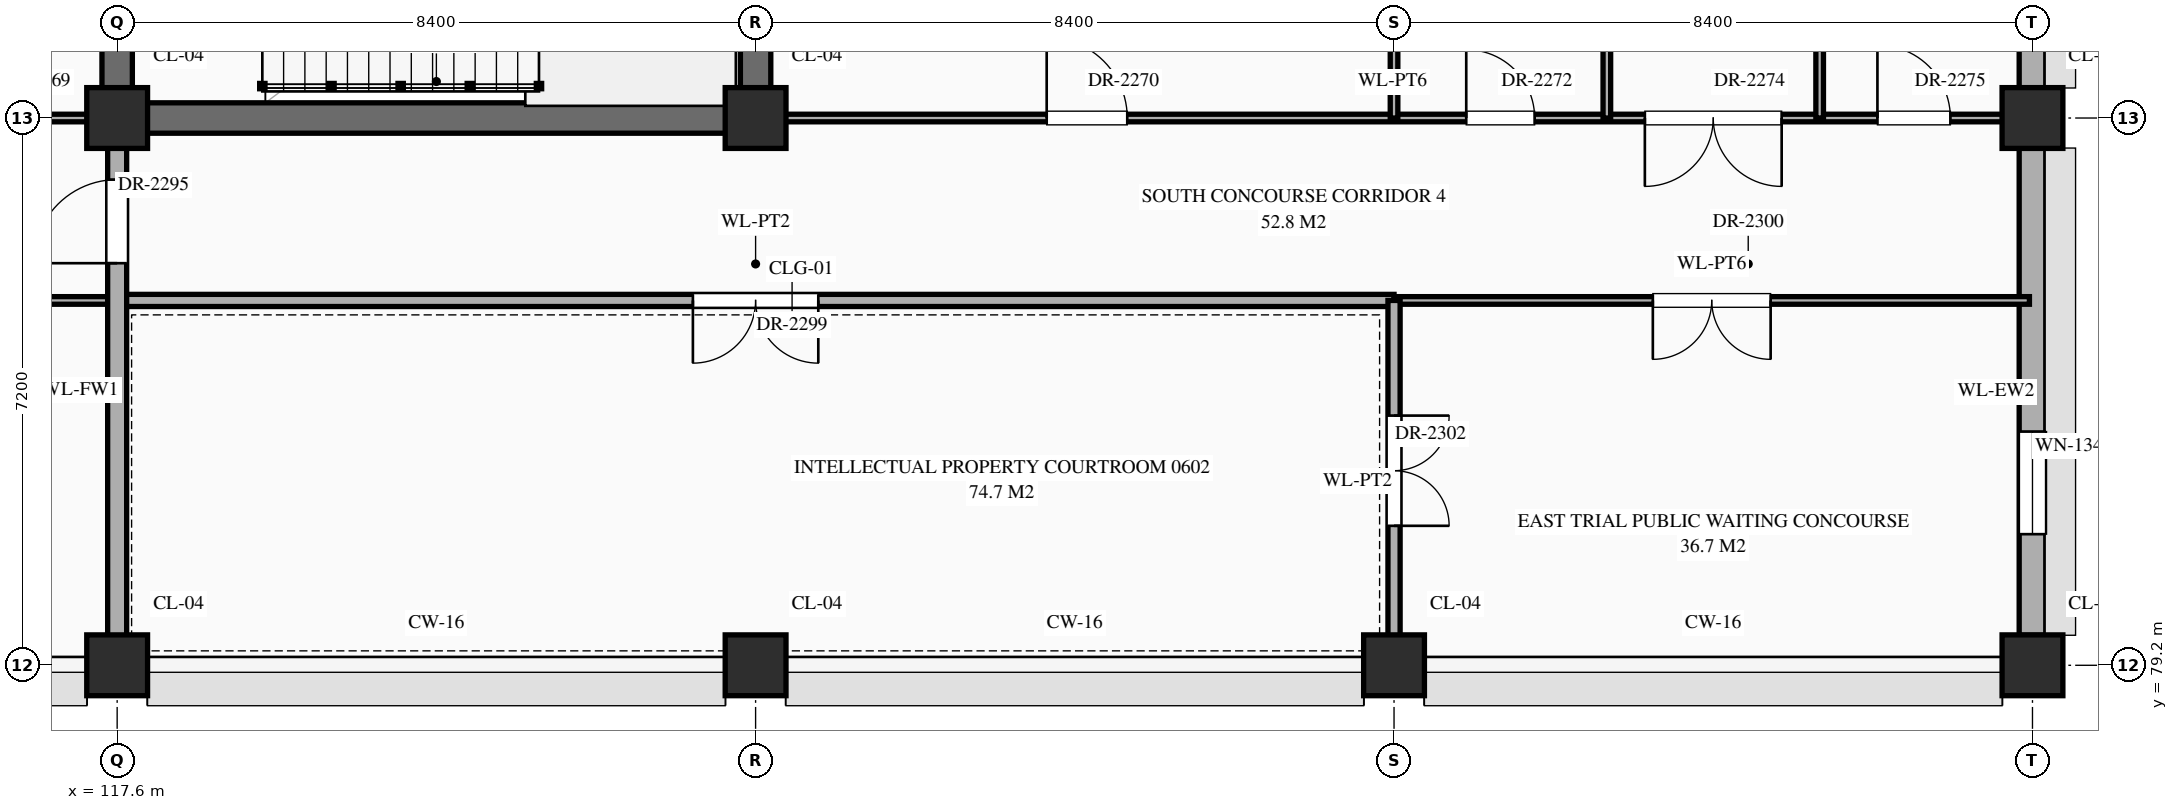
"""IFC4 building model, lengths in metres.
Left out: names, types, materials, properties, quantities, classifications, styles, units other than length and angle.
Written with IfcOpenShell. Run it as: python <this file> out.ifc"""

import sys

from ifc_helpers import new_model, si_unit, direction, frame, frame_2d, origin, origin_2d, place, context, subcontext, project, spatial, rectangle, extrude, element, fill, save


model = new_model("IFC4")
c1 = context("Model", 3, precision=1e-05, world=origin(), true_north=direction((0.0, 1.0)))
c2 = subcontext(c1, "Body", "Model", "MODEL_VIEW")
j1 = project(units=[si_unit("LENGTHUNIT", "METRE"), si_unit("PLANEANGLEUNIT", "RADIAN")], contexts=[c1])
p1 = place(None, origin())
s1 = spatial("IfcSite", under=j1, at=p1, CompositionType="ELEMENT")
p2 = place(p1, origin())
s2 = spatial("IfcBuilding", under=s1, at=p2, CompositionType="ELEMENT")
p3 = place(p2, frame((0.0, 0.0, 26.1)))
s3 = spatial("IfcBuildingStorey", under=s2, at=p3, CompositionType="ELEMENT", Elevation=26.1)
for number, where, z_axis, x_axis in (
    (1, (117.6, 79.2, 0.0), (0.0, 0.0, 1.0), (1.0, 0.0, 0.0)),
    (2, (117.6, 86.4, 0.0), (0.0, 0.0, 1.0), (1.0, 0.0, 0.0)),
    (3, (126.0, 79.2, 0.0), (0.0, 0.0, 1.0), (1.0, 0.0, 0.0)),
    (4, (126.0, 86.4, 0.0), (0.0, 0.0, 1.0), (1.0, 0.0, 0.0)),
    (5, (134.4, 79.2, 0.0), (0.0, 0.0, 1.0), (1.0, 0.0, 0.0)),
    (6, (142.8, 79.2, 0.0), (0.0, 0.0, 1.0), (1.0, 0.0, 0.0)),
    (7, (142.8, 86.4, 0.0), (0.0, 0.0, 1.0), (1.0, 0.0, 0.0)),
):
    element("IfcColumn", number, at=place(p3, frame(where, z_axis=z_axis, x_axis=x_axis)), inside=s3, PredefinedType="COLUMN", context=c2, shape_type="SweptSolid", body=[
        extrude(rectangle(XDim=0.8, YDim=0.8, at=origin_2d()), origin(), (0.0, 0.0, 1.0), 4.5),
    ])
p4 = place(p3, frame((142.8, 79.595, 0.0), z_axis=(0.0, 0.0, 1.0), x_axis=(0.0, 1.0, 0.0)))
e8 = element("IfcWall", 8, at=p4, inside=s3, PredefinedType="STANDARD", context=c2, shape_type="SweptSolid", body=[
    extrude(rectangle(XDim=6.41, YDim=0.35, at=frame_2d((3.205, 0.0))), origin(), (0.0, 0.0, 1.0), 3.59),
])
p5 = place(p4, frame((1.33, 0.0, 0.85)))
e9 = element("IfcOpeningElement", 9, at=p5, cuts=e8, PredefinedType="OPENING", context=c2, shape_type="SweptSolid", body=[
    extrude(rectangle(XDim=1.35, YDim=1.92, at=frame_2d((0.675, 0.96))), frame((0.0, 0.187, 0.0), z_axis=(0.0, -1.0, 0.0), x_axis=(1.0, 0.0, 0.0)), (0.0, 0.0, 1.0), 0.374),
])
p6 = place(p3, frame((142.8, 86.795, 0.0), z_axis=(0.0, 0.0, 1.0), x_axis=(0.0, 1.0, 0.0)))
e10 = element("IfcWall", 10, at=p6, inside=s3, PredefinedType="STANDARD", context=c2, shape_type="SweptSolid", body=[
    extrude(rectangle(XDim=6.41, YDim=0.35, at=frame_2d((3.205, 0.0))), origin(), (0.0, 0.0, 1.0), 3.59),
])
p7 = place(p6, frame((2.605, 0.0, 0.85)))
e11 = element("IfcOpeningElement", 11, at=p7, cuts=e10, PredefinedType="OPENING", context=c2, shape_type="SweptSolid", body=[
    extrude(rectangle(XDim=1.2, YDim=2.12, at=frame_2d((0.6, 1.06))), frame((0.0, 0.187, 0.0), z_axis=(0.0, -1.0, 0.0), x_axis=(1.0, 0.0, 0.0)), (0.0, 0.0, 1.0), 0.374),
])
p8 = place(p3, frame((100.8, 84.0, 0.0), z_axis=(0.0, 0.0, 1.0), x_axis=(1.0, 0.0, 0.0)))
e12 = element("IfcWall", 12, at=p8, inside=s3, PredefinedType="STANDARD", context=c2, shape_type="SweptSolid", body=[
    extrude(rectangle(XDim=16.8, YDim=0.1, at=frame_2d((8.4, 0.0))), origin(), (0.0, 0.0, 1.0), 4.24),
])
p9 = place(p8, frame((3.62, 0.0, 0.0)))
e13 = element("IfcOpeningElement", 13, at=p9, cuts=e12, PredefinedType="OPENING", context=c2, shape_type="SweptSolid", body=[
    extrude(rectangle(XDim=1.16, YDim=2.3, at=frame_2d((0.58, 1.15))), frame((0.0, 0.062, 0.0), z_axis=(0.0, -1.0, 0.0), x_axis=(1.0, 0.0, 0.0)), (0.0, 0.0, 1.0), 0.124),
])
p10 = place(p8, frame((12.0, 0.0, 0.0)))
e14 = element("IfcOpeningElement", 14, at=p10, cuts=e12, PredefinedType="OPENING", context=c2, shape_type="SweptSolid", body=[
    extrude(rectangle(XDim=1.2, YDim=2.35, at=frame_2d((0.6, 1.175))), frame((0.0, 0.062, 0.0), z_axis=(0.0, -1.0, 0.0), x_axis=(1.0, 0.0, 0.0)), (0.0, 0.0, 1.0), 0.124),
])
p11 = place(p3, frame((117.6, 84.0, 0.0), z_axis=(0.0, 0.0, 1.0), x_axis=(1.0, 0.0, 0.0)))
e15 = element("IfcWall", 15, at=p11, inside=s3, PredefinedType="STANDARD", context=c2, shape_type="SweptSolid", body=[
    extrude(rectangle(XDim=16.8, YDim=0.16, at=frame_2d((8.4, 0.0))), origin(), (0.0, 0.0, 1.0), 4.24),
])
p12 = place(p11, frame((7.575, 0.0, 0.0)))
e16 = element("IfcOpeningElement", 16, at=p12, cuts=e15, PredefinedType="OPENING", context=c2, shape_type="SweptSolid", body=[
    extrude(rectangle(XDim=1.65, YDim=2.4, at=frame_2d((0.825, 1.2))), frame((0.0, 0.092, 0.0), z_axis=(0.0, -1.0, 0.0), x_axis=(1.0, 0.0, 0.0)), (0.0, 0.0, 1.0), 0.184),
])
p13 = place(p3, frame((134.4, 84.0, 0.0), z_axis=(0.0, 0.0, 1.0), x_axis=(1.0, 0.0, 0.0)))
e17 = element("IfcWall", 17, at=p13, inside=s3, PredefinedType="STANDARD", context=c2, shape_type="SweptSolid", body=[
    extrude(rectangle(XDim=8.36, YDim=0.1, at=frame_2d((4.18, 0.0))), origin(), (0.0, 0.0, 1.0), 4.24),
])
p14 = place(p13, frame((3.405, 0.0, 0.0)))
e18 = element("IfcOpeningElement", 18, at=p14, cuts=e17, PredefinedType="OPENING", context=c2, shape_type="SweptSolid", body=[
    extrude(rectangle(XDim=1.55, YDim=2.35, at=frame_2d((0.775, 1.175))), frame((0.0, 0.062, 0.0), z_axis=(0.0, -1.0, 0.0), x_axis=(1.0, 0.0, 0.0)), (0.0, 0.0, 1.0), 0.124),
])
p15 = place(p3, frame((109.2, 86.4, 0.0), z_axis=(0.0, 0.0, 1.0), x_axis=(1.0, 0.0, 0.0)))
e19 = element("IfcWall", 19, at=p15, inside=s3, PredefinedType="STANDARD", context=c2, shape_type="SweptSolid", body=[
    extrude(rectangle(XDim=8.4, YDim=0.1, at=frame_2d((4.2, 0.0))), origin(), (0.0, 0.0, 1.0), 3.39),
])
p16 = place(p15, frame((0.92, 0.0, 0.0)))
e20 = element("IfcOpeningElement", 20, at=p16, cuts=e19, PredefinedType="OPENING", context=c2, shape_type="SweptSolid", body=[
    extrude(rectangle(XDim=1.28, YDim=2.35, at=frame_2d((0.64, 1.175))), frame((0.0, 0.062, 0.0), z_axis=(0.0, -1.0, 0.0), x_axis=(1.0, 0.0, 0.0)), (0.0, 0.0, 1.0), 0.124),
])
p17 = place(p15, frame((3.71, 0.0, 0.0)))
e21 = element("IfcOpeningElement", 21, at=p17, cuts=e19, PredefinedType="OPENING", context=c2, shape_type="SweptSolid", body=[
    extrude(rectangle(XDim=0.98, YDim=2.35, at=frame_2d((0.49, 1.175))), frame((0.0, 0.062, 0.0), z_axis=(0.0, -1.0, 0.0), x_axis=(1.0, 0.0, 0.0)), (0.0, 0.0, 1.0), 0.124),
])
p18 = place(p15, frame((6.33, 0.0, 0.0)))
e22 = element("IfcOpeningElement", 22, at=p18, cuts=e19, PredefinedType="OPENING", context=c2, shape_type="SweptSolid", body=[
    extrude(rectangle(XDim=1.02, YDim=2.4, at=frame_2d((0.51, 1.2))), frame((0.0, 0.062, 0.0), z_axis=(0.0, -1.0, 0.0), x_axis=(1.0, 0.0, 0.0)), (0.0, 0.0, 1.0), 0.124),
])
p19 = place(p3, frame((117.6, 86.4, 0.0), z_axis=(0.0, 0.0, 1.0), x_axis=(1.0, 0.0, 0.0)))
e23 = element("IfcWall", 23, at=p19, inside=s3, PredefinedType="SHEAR", context=c2, shape_type="SweptSolid", body=[
    extrude(rectangle(XDim=8.4, YDim=0.4, at=frame_2d((4.2, 0.0))), origin(), (0.0, 0.0, 1.0), 4.24),
])
p20 = place(p3, frame((126.0, 86.4, 0.0), z_axis=(0.0, 0.0, 1.0), x_axis=(1.0, 0.0, 0.0)))
e24 = element("IfcWall", 24, at=p20, inside=s3, PredefinedType="STANDARD", context=c2, shape_type="SweptSolid", body=[
    extrude(rectangle(XDim=16.76, YDim=0.1, at=frame_2d((8.38, 0.0))), origin(), (0.0, 0.0, 1.0), 3.19),
])
p21 = place(p20, frame((3.83, 0.0, 0.0)))
e25 = element("IfcOpeningElement", 25, at=p21, cuts=e24, PredefinedType="OPENING", context=c2, shape_type="SweptSolid", body=[
    extrude(rectangle(XDim=1.06, YDim=2.4, at=frame_2d((0.53, 1.2))), frame((0.0, 0.062, 0.0), z_axis=(0.0, -1.0, 0.0), x_axis=(1.0, 0.0, 0.0)), (0.0, 0.0, 1.0), 0.124),
])
p22 = place(p20, frame((9.35, 0.0, 0.0)))
e26 = element("IfcOpeningElement", 26, at=p22, cuts=e24, PredefinedType="OPENING", context=c2, shape_type="SweptSolid", body=[
    extrude(rectangle(XDim=0.9, YDim=2.15, at=frame_2d((0.45, 1.075))), frame((0.0, 0.062, 0.0), z_axis=(0.0, -1.0, 0.0), x_axis=(1.0, 0.0, 0.0)), (0.0, 0.0, 1.0), 0.124),
])
p23 = place(p20, frame((11.7, 0.0, 0.0)))
e27 = element("IfcOpeningElement", 27, at=p23, cuts=e24, PredefinedType="OPENING", context=c2, shape_type="SweptSolid", body=[
    extrude(rectangle(XDim=1.8, YDim=2.5, at=frame_2d((0.9, 1.25))), frame((0.0, 0.062, 0.0), z_axis=(0.0, -1.0, 0.0), x_axis=(1.0, 0.0, 0.0)), (0.0, 0.0, 1.0), 0.124),
])
p24 = place(p20, frame((14.76, 0.0, 0.0)))
e28 = element("IfcOpeningElement", 28, at=p24, cuts=e24, PredefinedType="OPENING", context=c2, shape_type="SweptSolid", body=[
    extrude(rectangle(XDim=0.96, YDim=2.2, at=frame_2d((0.48, 1.1))), frame((0.0, 0.062, 0.0), z_axis=(0.0, -1.0, 0.0), x_axis=(1.0, 0.0, 0.0)), (0.0, 0.0, 1.0), 0.124),
])
p25 = place(p3, frame((117.6, 79.24, 0.0), z_axis=(0.0, 0.0, 1.0), x_axis=(0.0, 1.0, 0.0)))
e29 = element("IfcWall", 29, at=p25, inside=s3, PredefinedType="STANDARD", context=c2, shape_type="SweptSolid", body=[
    extrude(rectangle(XDim=7.16, YDim=0.25, at=frame_2d((3.58, 0.0))), origin(), (0.0, 0.0, 1.0), 3.49),
])
p26 = place(p25, frame((5.25, 0.0, 0.0)))
e30 = element("IfcOpeningElement", 30, at=p26, cuts=e29, PredefinedType="OPENING", context=c2, shape_type="SweptSolid", body=[
    extrude(rectangle(XDim=1.1, YDim=2.2, at=frame_2d((0.55, 1.1))), frame((0.0, 0.137, 0.0), z_axis=(0.0, -1.0, 0.0), x_axis=(1.0, 0.0, 0.0)), (0.0, 0.0, 1.0), 0.274),
])
for number, where, z_axis, x_axis in (
    (31, (117.6, 86.4, 0.0), (0.0, 0.0, 1.0), (0.0, 1.0, 0.0)),
    (32, (126.0, 86.4, 0.0), (0.0, 0.0, 1.0), (0.0, 1.0, 0.0)),
):
    element("IfcWall", number, at=place(p3, frame(where, z_axis=z_axis, x_axis=x_axis)), inside=s3, PredefinedType="SHEAR", context=c2, shape_type="SweptSolid", body=[
        extrude(rectangle(XDim=4.8, YDim=0.4, at=frame_2d((2.4, 0.0))), origin(), (0.0, 0.0, 1.0), 4.24),
    ])
p27 = place(p3, frame((134.4, 79.24, 0.0), z_axis=(0.0, 0.0, 1.0), x_axis=(0.0, 1.0, 0.0)))
e33 = element("IfcWall", 33, at=p27, inside=s3, PredefinedType="STANDARD", context=c2, shape_type="SweptSolid", body=[
    extrude(rectangle(XDim=4.76, YDim=0.16, at=frame_2d((2.38, 0.0))), origin(), (0.0, 0.0, 1.0), 4.24),
])
p28 = place(p27, frame((1.795, 0.0, 0.0)))
e34 = element("IfcOpeningElement", 34, at=p28, cuts=e33, PredefinedType="OPENING", context=c2, shape_type="SweptSolid", body=[
    extrude(rectangle(XDim=1.45, YDim=2.3, at=frame_2d((0.725, 1.15))), frame((0.0, 0.092, 0.0), z_axis=(0.0, -1.0, 0.0), x_axis=(1.0, 0.0, 0.0)), (0.0, 0.0, 1.0), 0.184),
])
p29 = place(p3, frame((134.4, 86.4, 0.0), z_axis=(0.0, 0.0, 1.0), x_axis=(0.0, 1.0, 0.0)))
e35 = element("IfcWall", 35, at=p29, inside=s3, PredefinedType="STANDARD", context=c2, shape_type="SweptSolid", body=[
    extrude(rectangle(XDim=7.2, YDim=0.1, at=frame_2d((3.6, 0.0))), origin(), (0.0, 0.0, 1.0), 4.24),
])
p30 = place(p3, frame((137.2, 86.4, 0.0), z_axis=(0.0, 0.0, 1.0), x_axis=(0.0, 1.0, 0.0)))
e36 = element("IfcWall", 36, at=p30, inside=s3, PredefinedType="STANDARD", context=c2, shape_type="SweptSolid", body=[
    extrude(rectangle(XDim=7.2, YDim=0.1, at=frame_2d((3.6, 0.0))), origin(), (0.0, 0.0, 1.0), 4.24),
])
p31 = place(p30, frame((3.03, 0.0, 0.0)))
e37 = element("IfcOpeningElement", 37, at=p31, cuts=e36, PredefinedType="OPENING", context=c2, shape_type="SweptSolid", body=[
    extrude(rectangle(XDim=1.14, YDim=2.4, at=frame_2d((0.57, 1.2))), frame((0.0, 0.062, 0.0), z_axis=(0.0, -1.0, 0.0), x_axis=(1.0, 0.0, 0.0)), (0.0, 0.0, 1.0), 0.124),
])
p32 = place(p3, frame((140.0, 86.4, 0.0), z_axis=(0.0, 0.0, 1.0), x_axis=(0.0, 1.0, 0.0)))
e38 = element("IfcWall", 38, at=p32, inside=s3, PredefinedType="STANDARD", context=c2, shape_type="SweptSolid", body=[
    extrude(rectangle(XDim=7.2, YDim=0.1, at=frame_2d((3.6, 0.0))), origin(), (0.0, 0.0, 1.0), 4.24),
])
p33 = place(p32, frame((3.17, 0.0, 0.0)))
e39 = element("IfcOpeningElement", 39, at=p33, cuts=e38, PredefinedType="OPENING", context=c2, shape_type="SweptSolid", body=[
    extrude(rectangle(XDim=0.86, YDim=2.1, at=frame_2d((0.43, 1.05))), frame((0.0, 0.062, 0.0), z_axis=(0.0, -1.0, 0.0), x_axis=(1.0, 0.0, 0.0)), (0.0, 0.0, 1.0), 0.124),
])
p34 = place(p5, origin())
e40 = element("IfcWindow", 40, at=p34, inside=s3, PartitioningType="SINGLE_PANEL", PredefinedType="WINDOW", context=c2, shape_type="SweptSolid", body=[
    extrude(rectangle(XDim=1.35, YDim=1.92, at=frame_2d((0.675, 0.96))), frame((0.0, 0.03, 0.0), z_axis=(0.0, -1.0, 0.0), x_axis=(1.0, 0.0, 0.0)), (0.0, 0.0, 1.0), 0.06),
])
fill(e9, e40)
p35 = place(p21, origin())
e41 = element("IfcDoor", 41, at=p35, inside=s3, OperationType="SINGLE_SWING_LEFT", PredefinedType="DOOR", context=c2, shape_type="SweptSolid", body=[
    extrude(rectangle(XDim=1.06, YDim=2.4, at=frame_2d((0.53, 1.2))), frame((0.0, 0.025, 0.0), z_axis=(0.0, -1.0, 0.0), x_axis=(1.0, 0.0, 0.0)), (0.0, 0.0, 1.0), 0.05),
])
fill(e25, e41)
p36 = place(p22, origin())
e42 = element("IfcDoor", 42, at=p36, inside=s3, OperationType="SINGLE_SWING_LEFT", PredefinedType="DOOR", context=c2, shape_type="SweptSolid", body=[
    extrude(rectangle(XDim=0.9, YDim=2.15, at=frame_2d((0.45, 1.075))), frame((0.0, 0.025, 0.0), z_axis=(0.0, -1.0, 0.0), x_axis=(1.0, 0.0, 0.0)), (0.0, 0.0, 1.0), 0.05),
])
fill(e26, e42)
p37 = place(p23, frame((1.8, 0.0, 0.0), z_axis=(0.0, 0.0, 1.0), x_axis=(-1.0, 0.0, 0.0)))
e43 = element("IfcDoor", 43, at=p37, inside=s3, OperationType="DOUBLE_DOOR_SINGLE_SWING", PredefinedType="DOOR", context=c2, shape_type="SweptSolid", body=[
    extrude(rectangle(XDim=1.8, YDim=2.5, at=frame_2d((0.9, 1.25))), frame((0.0, 0.025, 0.0), z_axis=(0.0, -1.0, 0.0), x_axis=(1.0, 0.0, 0.0)), (0.0, 0.0, 1.0), 0.05),
])
fill(e27, e43)
p38 = place(p24, origin())
e44 = element("IfcDoor", 44, at=p38, inside=s3, OperationType="SINGLE_SWING_LEFT", PredefinedType="DOOR", context=c2, shape_type="SweptSolid", body=[
    extrude(rectangle(XDim=0.96, YDim=2.2, at=frame_2d((0.48, 1.1))), frame((0.0, 0.025, 0.0), z_axis=(0.0, -1.0, 0.0), x_axis=(1.0, 0.0, 0.0)), (0.0, 0.0, 1.0), 0.05),
])
fill(e28, e44)
p39 = place(p26, origin())
e45 = element("IfcDoor", 45, at=p39, inside=s3, OperationType="SINGLE_SWING_LEFT", PredefinedType="DOOR", context=c2, shape_type="SweptSolid", body=[
    extrude(rectangle(XDim=1.1, YDim=2.2, at=frame_2d((0.55, 1.1))), frame((0.0, 0.025, 0.0), z_axis=(0.0, -1.0, 0.0), x_axis=(1.0, 0.0, 0.0)), (0.0, 0.0, 1.0), 0.05),
])
fill(e30, e45)
p40 = place(p12, frame((1.65, 0.0, 0.0), z_axis=(0.0, 0.0, 1.0), x_axis=(-1.0, 0.0, 0.0)))
e46 = element("IfcDoor", 46, at=p40, inside=s3, OperationType="DOUBLE_DOOR_SINGLE_SWING", PredefinedType="DOOR", context=c2, shape_type="SweptSolid", body=[
    extrude(rectangle(XDim=1.65, YDim=2.4, at=frame_2d((0.825, 1.2))), frame((0.0, 0.025, 0.0), z_axis=(0.0, -1.0, 0.0), x_axis=(1.0, 0.0, 0.0)), (0.0, 0.0, 1.0), 0.05),
])
fill(e16, e46)
p41 = place(p14, frame((1.55, 0.0, 0.0), z_axis=(0.0, 0.0, 1.0), x_axis=(-1.0, 0.0, 0.0)))
e47 = element("IfcDoor", 47, at=p41, inside=s3, OperationType="DOUBLE_DOOR_SINGLE_SWING", PredefinedType="DOOR", context=c2, shape_type="SweptSolid", body=[
    extrude(rectangle(XDim=1.55, YDim=2.35, at=frame_2d((0.775, 1.175))), frame((0.0, 0.025, 0.0), z_axis=(0.0, -1.0, 0.0), x_axis=(1.0, 0.0, 0.0)), (0.0, 0.0, 1.0), 0.05),
])
fill(e18, e47)
p42 = place(p28, frame((1.45, 0.0, 0.0), z_axis=(0.0, 0.0, 1.0), x_axis=(-1.0, 0.0, 0.0)))
e48 = element("IfcDoor", 48, at=p42, inside=s3, OperationType="DOUBLE_DOOR_SINGLE_SWING", PredefinedType="DOOR", context=c2, shape_type="SweptSolid", body=[
    extrude(rectangle(XDim=1.45, YDim=2.3, at=frame_2d((0.725, 1.15))), frame((0.0, 0.025, 0.0), z_axis=(0.0, -1.0, 0.0), x_axis=(1.0, 0.0, 0.0)), (0.0, 0.0, 1.0), 0.05),
])
fill(e34, e48)
save(model, sys.argv[1])
